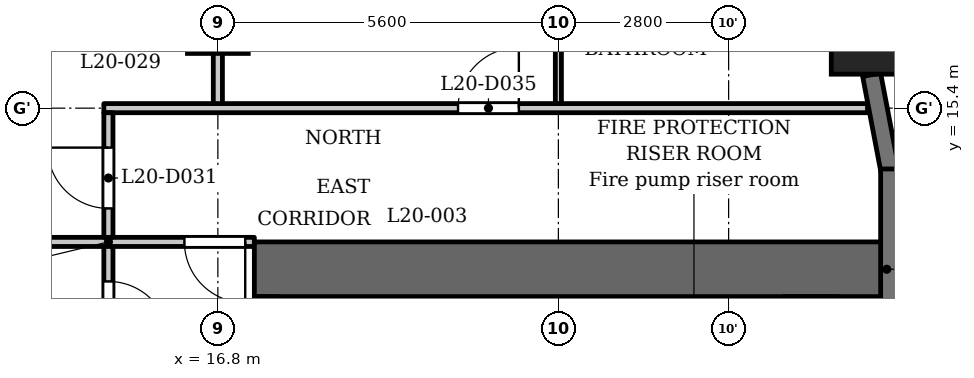
"""IFC4 building model, lengths in metres.
Left out: names, types, materials, properties, quantities, classifications, styles, units other than length and angle.
Written with IfcOpenShell. Run it as: python <this file> out.ifc"""

import sys

from ifc_helpers import new_model, si_unit, direction, frame, frame_2d, origin, origin_2d, place, context, subcontext, project, spatial, rectangle, extrude, element, fill, save


model = new_model("IFC4")
c1 = context("Model", 3, precision=1e-05, world=origin(), true_north=direction((0.0, 1.0)))
c2 = subcontext(c1, "Body", "Model", "MODEL_VIEW")
j1 = project(units=[si_unit("LENGTHUNIT", "METRE"), si_unit("PLANEANGLEUNIT", "RADIAN")], contexts=[c1])
p1 = place(None, origin())
s1 = spatial("IfcSite", under=j1, at=p1, CompositionType="ELEMENT")
p2 = place(p1, origin())
s2 = spatial("IfcBuilding", under=s1, at=p2, CompositionType="ELEMENT")
p3 = place(p2, frame((0.0, 0.0, 83.3)))
s3 = spatial("IfcBuildingStorey", under=s2, at=p3, CompositionType="ELEMENT", Elevation=83.3)
p4 = place(p3, frame((27.538, 16.609, 0.0), z_axis=(0.0, 0.0, 1.0), x_axis=(1.0, 0.0, 0.0)))
e1 = element("IfcColumn", 1, at=p4, inside=s3, PredefinedType="COLUMN", context=c2, shape_type="SweptSolid", body=[
    extrude(rectangle(XDim=1.3, YDim=1.3, at=origin_2d()), origin(), (0.0, 0.0, 1.0), 3.5),
])
p5 = place(p3, frame((16.8, 16.8, 0.0), z_axis=(0.0, 0.0, 1.0), x_axis=(1.0, 0.0, 0.0)))
e2 = element("IfcColumn", 2, at=p5, inside=s3, PredefinedType="COLUMN", context=c2, shape_type="SweptSolid", body=[
    extrude(rectangle(XDim=1.0, YDim=1.0, at=origin_2d()), origin(), (0.0, 0.0, 1.0), 3.5),
])
p6 = place(p3, frame((27.85, 11.85, 0.0), z_axis=(0.0, 0.0, 1.0), x_axis=(0.0, 1.0, 0.0)))
e3 = element("IfcWall", 3, at=p6, inside=s3, PredefinedType="SOLIDWALL", context=c2, shape_type="SweptSolid", body=[
    extrude(rectangle(XDim=2.55, YDim=0.3, at=frame_2d((1.275, 0.0))), origin(), (0.0, 0.0, 1.0), 2.4),
])
p7 = place(p3, frame((27.853, 14.372, 0.0), z_axis=(0.0, 0.0, 1.0), x_axis=(-0.187279751651, 0.982306619453, 0.0)))
e4 = element("IfcWall", 4, at=p7, inside=s3, PredefinedType="SOLIDWALL", context=c2, shape_type="SweptSolid", body=[
    extrude(rectangle(XDim=1.606, YDim=0.3, at=frame_2d((0.803, 0.0))), origin(), (0.0, 0.0, 1.0), 2.4),
])
p8 = place(p3, frame((17.4, 12.75, 0.0), z_axis=(0.0, 0.0, 1.0), x_axis=(1.0, 0.0, 0.0)))
e5 = element("IfcWall", 5, at=p8, inside=s3, PredefinedType="SHEAR", context=c2, shape_type="SweptSolid", body=[
    extrude(rectangle(XDim=10.4, YDim=0.9, at=frame_2d((5.2, 0.0))), origin(), (0.0, 0.0, 1.0), 3.2),
])
p9 = place(p3, frame((17.6, -12.3, 0.0), z_axis=(0.0, 0.0, 1.0), x_axis=(0.0, 1.0, 0.0)))
e6 = element("IfcWall", 6, at=p9, inside=s3, PredefinedType="SHEAR", context=c2, shape_type="SweptSolid", body=[
    extrude(rectangle(XDim=24.6, YDim=0.4, at=frame_2d((12.3, 0.0))), origin(), (0.0, 0.0, 1.0), 3.2),
])
p10 = place(p9, frame((6.0, 0.0, 0.0)))
e7 = element("IfcOpeningElement", 7, at=p10, cuts=e6, PredefinedType="OPENING", context=c2, shape_type="SweptSolid", body=[
    extrude(rectangle(XDim=1.1, YDim=2.1, at=frame_2d((0.55, 1.05))), frame((0.0, 0.21, 0.0), z_axis=(0.0, -1.0, 0.0), x_axis=(1.0, 0.0, 0.0)), (0.0, 0.0, 1.0), 0.42),
])
p11 = place(p9, frame((8.4, 0.0, 0.0)))
e8 = element("IfcOpeningElement", 8, at=p11, cuts=e6, PredefinedType="OPENING", context=c2, shape_type="SweptSolid", body=[
    extrude(rectangle(XDim=1.1, YDim=2.1, at=frame_2d((0.55, 1.05))), frame((0.0, 0.21, 0.0), z_axis=(0.0, -1.0, 0.0), x_axis=(1.0, 0.0, 0.0)), (0.0, 0.0, 1.0), 0.42),
])
p12 = place(p9, frame((10.8, 0.0, 0.0)))
e9 = element("IfcOpeningElement", 9, at=p12, cuts=e6, PredefinedType="OPENING", context=c2, shape_type="SweptSolid", body=[
    extrude(rectangle(XDim=1.1, YDim=2.1, at=frame_2d((0.55, 1.05))), frame((0.0, 0.21, 0.0), z_axis=(0.0, -1.0, 0.0), x_axis=(1.0, 0.0, 0.0)), (0.0, 0.0, 1.0), 0.42),
])
p13 = place(p9, frame((16.75, 0.0, 0.0)))
e10 = element("IfcOpeningElement", 10, at=p13, cuts=e6, PredefinedType="OPENING", context=c2, shape_type="SweptSolid", body=[
    extrude(rectangle(XDim=0.9, YDim=2.1, at=frame_2d((0.45, 1.05))), frame((0.0, 0.21, 0.0), z_axis=(0.0, -1.0, 0.0), x_axis=(1.0, 0.0, 0.0)), (0.0, 0.0, 1.0), 0.42),
])
p14 = place(p9, frame((22.8, 0.0, 0.0)))
e11 = element("IfcOpeningElement", 11, at=p14, cuts=e6, PredefinedType="OPENING", context=c2, shape_type="SweptSolid", body=[
    extrude(rectangle(XDim=1.1, YDim=2.1, at=frame_2d((0.55, 1.05))), frame((0.0, 0.21, 0.0), z_axis=(0.0, -1.0, 0.0), x_axis=(1.0, 0.0, 0.0)), (0.0, 0.0, 1.0), 0.42),
])
p15 = place(p9, frame((0.7, 0.0, 0.0)))
e12 = element("IfcOpeningElement", 12, at=p15, cuts=e6, PredefinedType="OPENING", context=c2, shape_type="SweptSolid", body=[
    extrude(rectangle(XDim=1.1, YDim=2.1, at=frame_2d((0.55, 1.05))), frame((0.0, 0.21, 0.0), z_axis=(0.0, -1.0, 0.0), x_axis=(1.0, 0.0, 0.0)), (0.0, 0.0, 1.0), 0.42),
])
p16 = place(p9, frame((12.775, 0.0, 0.0)))
e13 = element("IfcOpeningElement", 13, at=p16, cuts=e6, PredefinedType="OPENING", context=c2, shape_type="SweptSolid", body=[
    extrude(rectangle(XDim=1.8, YDim=2.1, at=frame_2d((0.9, 1.05))), frame((0.0, 0.21, 0.0), z_axis=(0.0, -1.0, 0.0), x_axis=(1.0, 0.0, 0.0)), (0.0, 0.0, 1.0), 0.42),
])
p17 = place(p3, frame((26.55, -12.3, 0.0), z_axis=(0.0, 0.0, 1.0), x_axis=(0.0, 1.0, 0.0)))
e14 = element("IfcWall", 14, at=p17, inside=s3, PredefinedType="SHEAR", context=c2, shape_type="SweptSolid", body=[
    extrude(rectangle(XDim=24.6, YDim=0.9, at=frame_2d((12.3, 0.0))), origin(), (0.0, 0.0, 1.0), 3.2),
])
p18 = place(p3, frame((23.55, 9.8, 0.0), z_axis=(0.0, 0.0, 1.0), x_axis=(0.0, 1.0, 0.0)))
e15 = element("IfcWall", 15, at=p18, inside=s3, PredefinedType="PARTITIONING", context=c2, shape_type="SweptSolid", body=[
    extrude(rectangle(XDim=2.5, YDim=0.2, at=frame_2d((1.25, 0.0))), origin(), (0.0, 0.0, 1.0), 3.2),
])
p19 = place(p18, frame((0.8, 0.0, 0.0)))
e16 = element("IfcOpeningElement", 16, at=p19, cuts=e15, PredefinedType="OPENING", context=c2, shape_type="SweptSolid", body=[
    extrude(rectangle(XDim=0.9, YDim=2.1, at=frame_2d((0.45, 1.05))), frame((0.0, 0.11, 0.0), z_axis=(0.0, -1.0, 0.0), x_axis=(1.0, 0.0, 0.0)), (0.0, 0.0, 1.0), 0.22),
])
p20 = place(p3, frame((-17.4, 13.2, 0.0), z_axis=(0.0, 0.0, 1.0), x_axis=(1.0, 0.0, 0.0)))
e17 = element("IfcWall", 17, at=p20, inside=s3, PredefinedType="PARTITIONING", context=c2, shape_type="SweptSolid", body=[
    extrude(rectangle(XDim=34.8, YDim=0.15, at=frame_2d((17.4, 0.0))), origin(), (0.0, 0.0, 1.0), 3.2),
])
p21 = place(p20, frame((0.25, 0.0, 0.0)))
e18 = element("IfcOpeningElement", 18, at=p21, cuts=e17, PredefinedType="OPENING", context=c2, shape_type="SweptSolid", body=[
    extrude(rectangle(XDim=1.0, YDim=2.1, at=frame_2d((0.5, 1.05))), frame((0.0, 0.085, 0.0), z_axis=(0.0, -1.0, 0.0), x_axis=(1.0, 0.0, 0.0)), (0.0, 0.0, 1.0), 0.17),
])
p22 = place(p20, frame((33.65, 0.0, 0.0)))
e19 = element("IfcOpeningElement", 19, at=p22, cuts=e17, PredefinedType="OPENING", context=c2, shape_type="SweptSolid", body=[
    extrude(rectangle(XDim=1.0, YDim=2.1, at=frame_2d((0.5, 1.05))), frame((0.0, 0.085, 0.0), z_axis=(0.0, -1.0, 0.0), x_axis=(1.0, 0.0, 0.0)), (0.0, 0.0, 1.0), 0.17),
])
p23 = place(p20, frame((15.75, 0.0, 0.0)))
e20 = element("IfcOpeningElement", 20, at=p23, cuts=e17, PredefinedType="OPENING", context=c2, shape_type="SweptSolid", body=[
    extrude(rectangle(XDim=1.0, YDim=2.1, at=frame_2d((0.5, 1.05))), frame((0.0, 0.085, 0.0), z_axis=(0.0, -1.0, 0.0), x_axis=(1.0, 0.0, 0.0)), (0.0, 0.0, 1.0), 0.17),
])
p24 = place(p20, frame((21.35, 0.0, 0.0)))
e21 = element("IfcOpeningElement", 21, at=p24, cuts=e17, PredefinedType="OPENING", context=c2, shape_type="SweptSolid", body=[
    extrude(rectangle(XDim=1.0, YDim=2.1, at=frame_2d((0.5, 1.05))), frame((0.0, 0.085, 0.0), z_axis=(0.0, -1.0, 0.0), x_axis=(1.0, 0.0, 0.0)), (0.0, 0.0, 1.0), 0.17),
])
p25 = place(p3, frame((14.925, 15.4, 0.0), z_axis=(0.0, 0.0, 1.0), x_axis=(1.0, 0.0, 0.0)))
e22 = element("IfcWall", 22, at=p25, inside=s3, PredefinedType="PARTITIONING", context=c2, shape_type="SweptSolid", body=[
    extrude(rectangle(XDim=12.559, YDim=0.15, at=frame_2d((6.279, 0.0))), origin(), (0.0, 0.0, 1.0), 3.2),
])
p26 = place(p25, frame((5.825, 0.0, 0.0)))
e23 = element("IfcOpeningElement", 23, at=p26, cuts=e22, PredefinedType="OPENING", context=c2, shape_type="SweptSolid", body=[
    extrude(rectangle(XDim=1.0, YDim=2.1, at=frame_2d((0.5, 1.05))), frame((0.0, 0.085, 0.0), z_axis=(0.0, -1.0, 0.0), x_axis=(1.0, 0.0, 0.0)), (0.0, 0.0, 1.0), 0.17),
])
p27 = place(p3, frame((15.0, 6.769, 0.0), z_axis=(0.0, 0.0, 1.0), x_axis=(0.0, 1.0, 0.0)))
e24 = element("IfcWall", 24, at=p27, inside=s3, PredefinedType="PARTITIONING", context=c2, shape_type="SweptSolid", body=[
    extrude(rectangle(XDim=6.356, YDim=0.15, at=frame_2d((3.178, 0.0))), origin(), (0.0, 0.0, 1.0), 3.2),
])
p28 = place(p27, frame((4.781, 0.0, 0.0)))
e25 = element("IfcOpeningElement", 25, at=p28, cuts=e24, PredefinedType="OPENING", context=c2, shape_type="SweptSolid", body=[
    extrude(rectangle(XDim=1.0, YDim=2.1, at=frame_2d((0.5, 1.05))), frame((0.0, 0.085, 0.0), z_axis=(0.0, -1.0, 0.0), x_axis=(1.0, 0.0, 0.0)), (0.0, 0.0, 1.0), 0.17),
])
p29 = place(p3, frame((15.0, 13.275, 0.0), z_axis=(0.0, 0.0, 1.0), x_axis=(0.0, 1.0, 0.0)))
e26 = element("IfcWall", 26, at=p29, inside=s3, PredefinedType="PARTITIONING", context=c2, shape_type="SweptSolid", body=[
    extrude(rectangle(XDim=2.05, YDim=0.15, at=frame_2d((1.025, 0.0))), origin(), (0.0, 0.0, 1.0), 3.2),
])
p30 = place(p29, frame((0.476, 0.0, 0.0)))
e27 = element("IfcOpeningElement", 27, at=p30, cuts=e26, PredefinedType="OPENING", context=c2, shape_type="SweptSolid", body=[
    extrude(rectangle(XDim=1.0, YDim=2.1, at=frame_2d((0.5, 1.05))), frame((0.0, 0.085, 0.0), z_axis=(0.0, -1.0, 0.0), x_axis=(1.0, 0.0, 0.0)), (0.0, 0.0, 1.0), 0.17),
])
p31 = place(p3, frame((16.8, 15.475, 0.0), z_axis=(0.0, 0.0, 1.0), x_axis=(0.0, 1.0, 0.0)))
e28 = element("IfcWall", 28, at=p31, inside=s3, PredefinedType="PARTITIONING", context=c2, shape_type="SweptSolid", body=[
    extrude(rectangle(XDim=7.555, YDim=0.15, at=frame_2d((3.777, 0.0))), origin(), (0.0, 0.0, 1.0), 3.2),
])
p32 = place(p3, frame((22.4, 15.475, 0.0), z_axis=(0.0, 0.0, 1.0), x_axis=(0.0, 1.0, 0.0)))
e29 = element("IfcWall", 29, at=p32, inside=s3, PredefinedType="PARTITIONING", context=c2, shape_type="SweptSolid", body=[
    extrude(rectangle(XDim=2.575, YDim=0.1, at=frame_2d((1.288, 0.0))), origin(), (0.0, 0.0, 1.0), 3.2),
])
p33 = place(p28, origin())
e30 = element("IfcDoor", 30, at=p33, inside=s3, OperationType="SINGLE_SWING_LEFT", PredefinedType="DOOR", context=c2, shape_type="SweptSolid", body=[
    extrude(rectangle(XDim=1.0, YDim=2.1, at=frame_2d((0.5, 1.05))), frame((0.0, 0.025, 0.0), z_axis=(0.0, -1.0, 0.0), x_axis=(1.0, 0.0, 0.0)), (0.0, 0.0, 1.0), 0.05),
])
fill(e25, e30)
p34 = place(p22, origin())
e31 = element("IfcDoor", 31, at=p34, inside=s3, OperationType="SINGLE_SWING_RIGHT", PredefinedType="DOOR", context=c2, shape_type="SweptSolid", body=[
    extrude(rectangle(XDim=1.0, YDim=2.1, at=frame_2d((0.5, 1.05))), frame((0.0, 0.025, 0.0), z_axis=(0.0, -1.0, 0.0), x_axis=(1.0, 0.0, 0.0)), (0.0, 0.0, 1.0), 0.05),
])
fill(e19, e31)
p35 = place(p30, origin())
e32 = element("IfcDoor", 32, at=p35, inside=s3, OperationType="SINGLE_SWING_LEFT", PredefinedType="DOOR", context=c2, shape_type="SweptSolid", body=[
    extrude(rectangle(XDim=1.0, YDim=2.1, at=frame_2d((0.5, 1.05))), frame((0.0, 0.025, 0.0), z_axis=(0.0, -1.0, 0.0), x_axis=(1.0, 0.0, 0.0)), (0.0, 0.0, 1.0), 0.05),
])
fill(e27, e32)
p36 = place(p26, origin())
e33 = element("IfcDoor", 33, at=p36, inside=s3, OperationType="SINGLE_SWING_LEFT", PredefinedType="DOOR", context=c2, shape_type="SweptSolid", body=[
    extrude(rectangle(XDim=1.0, YDim=2.1, at=frame_2d((0.5, 1.05))), frame((0.0, 0.025, 0.0), z_axis=(0.0, -1.0, 0.0), x_axis=(1.0, 0.0, 0.0)), (0.0, 0.0, 1.0), 0.05),
])
fill(e23, e33)
save(model, sys.argv[1])
